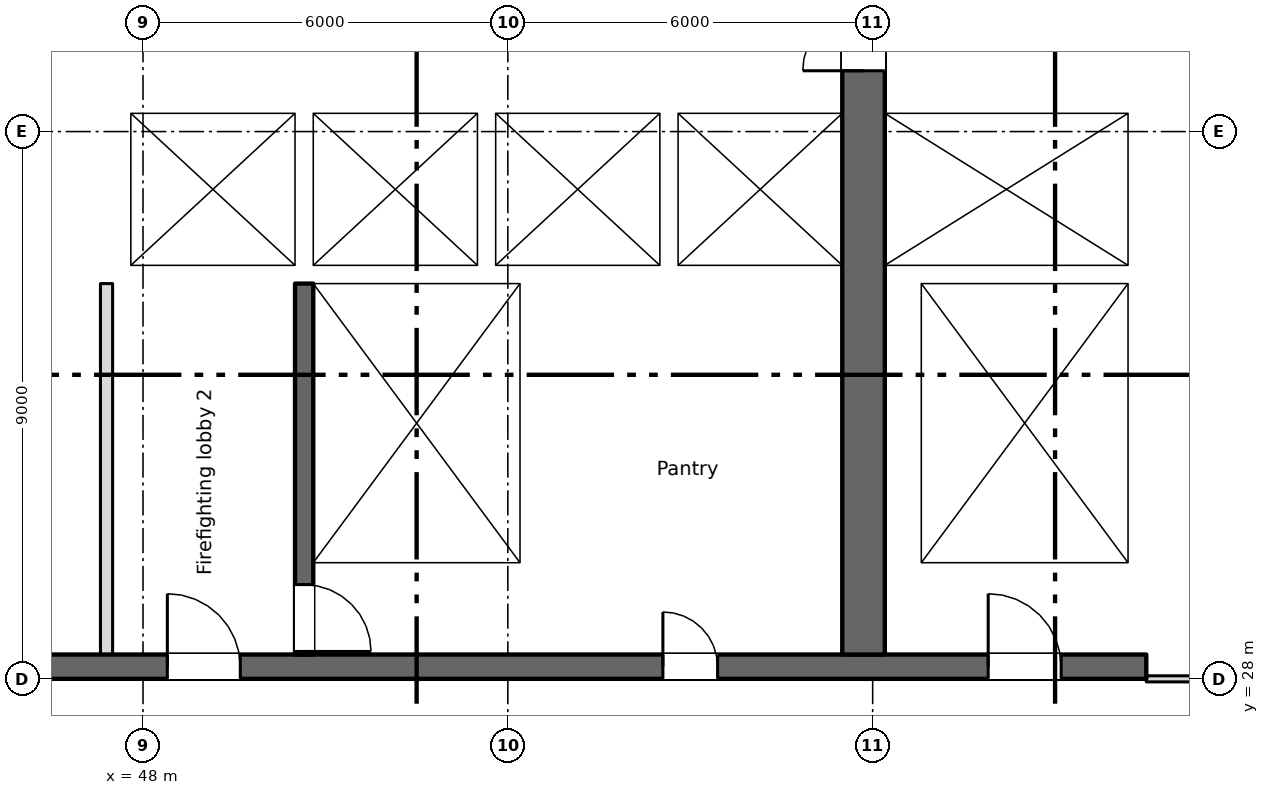
"""IFC4 building model, lengths in metres.
Left out: names, types, materials, properties, quantities, classifications, styles, units other than length and angle.
Written with IfcOpenShell. Run it as: python <this file> out.ifc"""

import sys

from ifc_helpers import new_model, si_unit, direction, frame, frame_2d, origin, place, context, subcontext, project, spatial, rectangle, extrude, element, fill, save


model = new_model("IFC4")
c1 = context("Model", 3, precision=1e-05, world=origin(), true_north=direction((0.0, 1.0)))
c2 = subcontext(c1, "Body", "Model", "MODEL_VIEW")
j1 = project(units=[si_unit("LENGTHUNIT", "METRE"), si_unit("PLANEANGLEUNIT", "RADIAN")], contexts=[c1])
p1 = place(None, origin())
s1 = spatial("IfcSite", under=j1, at=p1, CompositionType="ELEMENT")
p2 = place(p1, origin())
s2 = spatial("IfcBuilding", under=s1, at=p2, CompositionType="ELEMENT")
p3 = place(p2, frame((0.0, 0.0, 204.25)))
s3 = spatial("IfcBuildingStorey", under=s2, at=p3, CompositionType="ELEMENT", Elevation=204.25)
p4 = place(p3, frame((6.6, 28.2, 0.0), z_axis=(0.0, 0.0, 1.0), x_axis=(1.0, 0.0, 0.0)))
e1 = element("IfcWall", 1, at=p4, inside=s3, PredefinedType="SHEAR", context=c2, shape_type="SweptSolid", body=[
    extrude(rectangle(XDim=57.9, YDim=0.4, at=frame_2d((28.95, 0.0))), origin(), (0.0, 0.0, 1.0), 3.35),
])
p5 = place(p4, frame((12.663, 0.0, 0.0)))
e2 = element("IfcOpeningElement", 2, at=p5, cuts=e1, PredefinedType="OPENING", context=c2, shape_type="SweptSolid", body=[
    extrude(rectangle(XDim=0.9, YDim=2.1, at=frame_2d((0.45, 1.05))), frame((0.0, 0.21, 0.0), z_axis=(0.0, -1.0, 0.0), x_axis=(1.0, 0.0, 0.0)), (0.0, 0.0, 1.0), 0.42),
])
p6 = place(p4, frame((15.238, 0.0, 0.0)))
e3 = element("IfcOpeningElement", 3, at=p6, cuts=e1, PredefinedType="OPENING", context=c2, shape_type="SweptSolid", body=[
    extrude(rectangle(XDim=0.9, YDim=2.1, at=frame_2d((0.45, 1.05))), frame((0.0, 0.21, 0.0), z_axis=(0.0, -1.0, 0.0), x_axis=(1.0, 0.0, 0.0)), (0.0, 0.0, 1.0), 0.42),
])
p7 = place(p4, frame((49.95, 0.0, 0.0)))
e4 = element("IfcOpeningElement", 4, at=p7, cuts=e1, PredefinedType="OPENING", context=c2, shape_type="SweptSolid", body=[
    extrude(rectangle(XDim=0.9, YDim=2.1, at=frame_2d((0.45, 1.05))), frame((0.0, 0.21, 0.0), z_axis=(0.0, -1.0, 0.0), x_axis=(1.0, 0.0, 0.0)), (0.0, 0.0, 1.0), 0.42),
])
p8 = place(p4, frame((0.663, 0.0, 0.0)))
e5 = element("IfcOpeningElement", 5, at=p8, cuts=e1, PredefinedType="OPENING", context=c2, shape_type="SweptSolid", body=[
    extrude(rectangle(XDim=0.9, YDim=2.1, at=frame_2d((0.45, 1.05))), frame((0.0, 0.21, 0.0), z_axis=(0.0, -1.0, 0.0), x_axis=(1.0, 0.0, 0.0)), (0.0, 0.0, 1.0), 0.42),
])
p9 = place(p4, frame((2.238, 0.0, 0.0)))
e6 = element("IfcOpeningElement", 6, at=p9, cuts=e1, PredefinedType="OPENING", context=c2, shape_type="SweptSolid", body=[
    extrude(rectangle(XDim=0.9, YDim=2.1, at=frame_2d((0.45, 1.05))), frame((0.0, 0.21, 0.0), z_axis=(0.0, -1.0, 0.0), x_axis=(1.0, 0.0, 0.0)), (0.0, 0.0, 1.0), 0.42),
])
p10 = place(p4, frame((4.8, 0.0, 0.0)))
e7 = element("IfcOpeningElement", 7, at=p10, cuts=e1, PredefinedType="OPENING", context=c2, shape_type="SweptSolid", body=[
    extrude(rectangle(XDim=1.2, YDim=2.1, at=frame_2d((0.6, 1.05))), frame((0.0, 0.21, 0.0), z_axis=(0.0, -1.0, 0.0), x_axis=(1.0, 0.0, 0.0)), (0.0, 0.0, 1.0), 0.42),
])
p11 = place(p4, frame((31.8, 0.0, 0.0)))
e8 = element("IfcOpeningElement", 8, at=p11, cuts=e1, PredefinedType="OPENING", context=c2, shape_type="SweptSolid", body=[
    extrude(rectangle(XDim=1.2, YDim=2.1, at=frame_2d((0.6, 1.05))), frame((0.0, 0.21, 0.0), z_axis=(0.0, -1.0, 0.0), x_axis=(1.0, 0.0, 0.0)), (0.0, 0.0, 1.0), 0.42),
])
p12 = place(p4, frame((55.3, 0.0, 0.0)))
e9 = element("IfcOpeningElement", 9, at=p12, cuts=e1, PredefinedType="OPENING", context=c2, shape_type="SweptSolid", body=[
    extrude(rectangle(XDim=1.2, YDim=2.1, at=frame_2d((0.6, 1.05))), frame((0.0, 0.21, 0.0), z_axis=(0.0, -1.0, 0.0), x_axis=(1.0, 0.0, 0.0)), (0.0, 0.0, 1.0), 0.42),
])
p13 = place(p4, frame((21.8, 0.0, 0.0)))
e10 = element("IfcOpeningElement", 10, at=p13, cuts=e1, PredefinedType="OPENING", context=c2, shape_type="SweptSolid", body=[
    extrude(rectangle(XDim=1.2, YDim=2.1, at=frame_2d((0.6, 1.05))), frame((0.0, 0.21, 0.0), z_axis=(0.0, -1.0, 0.0), x_axis=(1.0, 0.0, 0.0)), (0.0, 0.0, 1.0), 0.42),
])
p14 = place(p4, frame((41.8, 0.0, 0.0)))
e11 = element("IfcOpeningElement", 11, at=p14, cuts=e1, PredefinedType="OPENING", context=c2, shape_type="SweptSolid", body=[
    extrude(rectangle(XDim=1.2, YDim=2.1, at=frame_2d((0.6, 1.05))), frame((0.0, 0.21, 0.0), z_axis=(0.0, -1.0, 0.0), x_axis=(1.0, 0.0, 0.0)), (0.0, 0.0, 1.0), 0.42),
])
p15 = place(p4, frame((24.95, 0.0, 0.0)))
e12 = element("IfcOpeningElement", 12, at=p15, cuts=e1, PredefinedType="OPENING", context=c2, shape_type="SweptSolid", body=[
    extrude(rectangle(XDim=2.4, YDim=2.1, at=frame_2d((1.2, 1.05))), frame((0.0, 0.21, 0.0), z_axis=(0.0, -1.0, 0.0), x_axis=(1.0, 0.0, 0.0)), (0.0, 0.0, 1.0), 0.42),
])
p16 = place(p4, frame((37.45, 0.0, 0.0)))
e13 = element("IfcOpeningElement", 13, at=p16, cuts=e1, PredefinedType="OPENING", context=c2, shape_type="SweptSolid", body=[
    extrude(rectangle(XDim=2.4, YDim=2.1, at=frame_2d((1.2, 1.05))), frame((0.0, 0.21, 0.0), z_axis=(0.0, -1.0, 0.0), x_axis=(1.0, 0.0, 0.0)), (0.0, 0.0, 1.0), 0.42),
])
p17 = place(p4, frame((8.1, 0.0, 0.0)))
e14 = element("IfcOpeningElement", 14, at=p17, cuts=e1, PredefinedType="OPENING", context=c2, shape_type="SweptSolid", body=[
    extrude(rectangle(XDim=2.4, YDim=2.1, at=frame_2d((1.2, 1.05))), frame((0.0, 0.21, 0.0), z_axis=(0.0, -1.0, 0.0), x_axis=(1.0, 0.0, 0.0)), (0.0, 0.0, 1.0), 0.42),
])
p18 = place(p4, frame((28.95, 0.0, 0.0)))
e15 = element("IfcOpeningElement", 15, at=p18, cuts=e1, PredefinedType="OPENING", context=c2, shape_type="SweptSolid", body=[
    extrude(rectangle(XDim=0.9, YDim=2.1, at=frame_2d((0.45, 1.05))), frame((0.0, 0.21, 0.0), z_axis=(0.0, -1.0, 0.0), x_axis=(1.0, 0.0, 0.0)), (0.0, 0.0, 1.0), 0.42),
])
p19 = place(p4, frame((34.95, 0.0, 0.0)))
e16 = element("IfcOpeningElement", 16, at=p19, cuts=e1, PredefinedType="OPENING", context=c2, shape_type="SweptSolid", body=[
    extrude(rectangle(XDim=0.9, YDim=2.1, at=frame_2d((0.45, 1.05))), frame((0.0, 0.21, 0.0), z_axis=(0.0, -1.0, 0.0), x_axis=(1.0, 0.0, 0.0)), (0.0, 0.0, 1.0), 0.42),
])
p20 = place(p3, frame((64.35, 34.8, 0.0), z_axis=(0.0, 0.0, 1.0), x_axis=(0.0, 1.0, 0.0)))
e17 = element("IfcWall", 17, at=p20, inside=s3, PredefinedType="SHEAR", context=c2, shape_type="SweptSolid", body=[
    extrude(rectangle(XDim=10.5, YDim=0.3, at=frame_2d((5.25, 0.0))), origin(), (0.0, 0.0, 1.0), 3.35),
])
p21 = place(p3, frame((59.85, 28.4, 0.0), z_axis=(0.0, 0.0, 1.0), x_axis=(0.0, 1.0, 0.0)))
e18 = element("IfcWall", 18, at=p21, inside=s3, PredefinedType="SHEAR", context=c2, shape_type="SweptSolid", body=[
    extrude(rectangle(XDim=16.9, YDim=0.7, at=frame_2d((8.45, 0.0))), origin(), (0.0, 0.0, 1.0), 3.35),
])
p22 = place(p21, frame((9.6, 0.0, 0.0)))
e19 = element("IfcOpeningElement", 19, at=p22, cuts=e18, PredefinedType="OPENING", context=c2, shape_type="SweptSolid", body=[
    extrude(rectangle(XDim=2.0, YDim=2.1, at=frame_2d((1.0, 1.05))), frame((0.0, 0.36, 0.0), z_axis=(0.0, -1.0, 0.0), x_axis=(1.0, 0.0, 0.0)), (0.0, 0.0, 1.0), 0.72),
])
p23 = place(p21, frame((15.4, 0.0, 0.0)))
e20 = element("IfcOpeningElement", 20, at=p23, cuts=e18, PredefinedType="OPENING", context=c2, shape_type="SweptSolid", body=[
    extrude(rectangle(XDim=1.2, YDim=2.1, at=frame_2d((0.6, 1.05))), frame((0.0, 0.36, 0.0), z_axis=(0.0, -1.0, 0.0), x_axis=(1.0, 0.0, 0.0)), (0.0, 0.0, 1.0), 0.72),
])
p24 = place(p3, frame((50.65, 34.5, 0.0), z_axis=(0.0, 0.0, 1.0), x_axis=(0.0, -1.0, 0.0)))
e21 = element("IfcWall", 21, at=p24, inside=s3, PredefinedType="SHEAR", context=c2, shape_type="SweptSolid", body=[
    extrude(rectangle(XDim=6.1, YDim=0.3, at=frame_2d((3.05, 0.0))), origin(), (0.0, 0.0, 1.0), 3.35),
])
p25 = place(p24, frame((4.95, 0.0, 0.0)))
e22 = element("IfcOpeningElement", 22, at=p25, cuts=e21, PredefinedType="OPENING", context=c2, shape_type="SweptSolid", body=[
    extrude(rectangle(XDim=1.1, YDim=2.1, at=frame_2d((0.55, 1.05))), frame((0.0, 0.16, 0.0), z_axis=(0.0, -1.0, 0.0), x_axis=(1.0, 0.0, 0.0)), (0.0, 0.0, 1.0), 0.32),
])
p26 = place(p3, frame((54.35, 28.4, 0.0), z_axis=(0.0, 0.0, 1.0), x_axis=(0.0, 1.0, 0.0)))
e23 = element("IfcWall", 23, at=p26, inside=s3, PredefinedType="SHEAR", context=c2, shape_type="SweptSolid", body=[
    extrude(rectangle(XDim=6.1, YDim=0.3, at=frame_2d((3.05, 0.0))), origin(), (0.0, 0.0, 1.0), 3.35),
])
p27 = place(p3, frame((60.5, 28.4, 0.0), z_axis=(0.0, 0.0, 1.0), x_axis=(0.0, 1.0, 0.0)))
e24 = element("IfcWall", 24, at=p27, inside=s3, PredefinedType="SHEAR", context=c2, shape_type="SweptSolid", body=[
    extrude(rectangle(XDim=6.1, YDim=0.6, at=frame_2d((3.05, 0.0))), origin(), (0.0, 0.0, 1.0), 3.35),
])
p28 = place(p3, frame((64.35, 28.4, 0.0), z_axis=(0.0, 0.0, 1.0), x_axis=(0.0, 1.0, 0.0)))
e25 = element("IfcWall", 25, at=p28, inside=s3, PredefinedType="SHEAR", context=c2, shape_type="SweptSolid", body=[
    extrude(rectangle(XDim=6.1, YDim=0.3, at=frame_2d((3.05, 0.0))), origin(), (0.0, 0.0, 1.0), 3.35),
])
p29 = place(p3, frame((47.3, 34.65, 0.0), z_axis=(0.0, 0.0, 1.0), x_axis=(1.0, 0.0, 0.0)))
e26 = element("IfcWall", 26, at=p29, inside=s3, PredefinedType="SHEAR", context=c2, shape_type="SweptSolid", body=[
    extrude(rectangle(XDim=12.2, YDim=0.3, at=frame_2d((6.1, 0.0))), origin(), (0.0, 0.0, 1.0), 3.35),
])
p30 = place(p29, frame((1.3, 0.0, 0.0)))
e27 = element("IfcOpeningElement", 27, at=p30, cuts=e26, PredefinedType="OPENING", context=c2, shape_type="SweptSolid", body=[
    extrude(rectangle(XDim=1.1, YDim=2.1, at=frame_2d((0.55, 1.05))), frame((0.0, 0.16, 0.0), z_axis=(0.0, -1.0, 0.0), x_axis=(1.0, 0.0, 0.0)), (0.0, 0.0, 1.0), 0.32),
])
p31 = place(p3, frame((60.2, 34.65, 0.0), z_axis=(0.0, 0.0, 1.0), x_axis=(1.0, 0.0, 0.0)))
e28 = element("IfcWall", 28, at=p31, inside=s3, PredefinedType="SHEAR", context=c2, shape_type="SweptSolid", body=[
    extrude(rectangle(XDim=4.3, YDim=0.3, at=frame_2d((2.15, 0.0))), origin(), (0.0, 0.0, 1.0), 3.35),
])
p32 = place(p3, frame((47.3, 37.45, 0.0), z_axis=(0.0, 0.0, 1.0), x_axis=(1.0, 0.0, 0.0)))
e29 = element("IfcWall", 29, at=p32, inside=s3, PredefinedType="SHEAR", context=c2, shape_type="SweptSolid", body=[
    extrude(rectangle(XDim=12.2, YDim=0.3, at=frame_2d((6.1, 0.0))), origin(), (0.0, 0.0, 1.0), 3.35),
])
p33 = place(p32, frame((4.3, 0.0, 0.0)))
e30 = element("IfcOpeningElement", 30, at=p33, cuts=e29, PredefinedType="OPENING", context=c2, shape_type="SweptSolid", body=[
    extrude(rectangle(XDim=1.1, YDim=2.1, at=frame_2d((0.55, 1.05))), frame((0.0, 0.16, 0.0), z_axis=(0.0, -1.0, 0.0), x_axis=(1.0, 0.0, 0.0)), (0.0, 0.0, 1.0), 0.32),
])
p34 = place(p32, frame((7.3, 0.0, 0.0)))
e31 = element("IfcOpeningElement", 31, at=p34, cuts=e29, PredefinedType="OPENING", context=c2, shape_type="SweptSolid", body=[
    extrude(rectangle(XDim=1.1, YDim=2.1, at=frame_2d((0.55, 1.05))), frame((0.0, 0.16, 0.0), z_axis=(0.0, -1.0, 0.0), x_axis=(1.0, 0.0, 0.0)), (0.0, 0.0, 1.0), 0.32),
])
p35 = place(p32, frame((10.3, 0.0, 0.0)))
e32 = element("IfcOpeningElement", 32, at=p35, cuts=e29, PredefinedType="OPENING", context=c2, shape_type="SweptSolid", body=[
    extrude(rectangle(XDim=1.1, YDim=2.1, at=frame_2d((0.55, 1.05))), frame((0.0, 0.16, 0.0), z_axis=(0.0, -1.0, 0.0), x_axis=(1.0, 0.0, 0.0)), (0.0, 0.0, 1.0), 0.32),
])
p36 = place(p3, frame((60.2, 37.45, 0.0), z_axis=(0.0, 0.0, 1.0), x_axis=(1.0, 0.0, 0.0)))
e33 = element("IfcWall", 33, at=p36, inside=s3, PredefinedType="SHEAR", context=c2, shape_type="SweptSolid", body=[
    extrude(rectangle(XDim=4.0, YDim=0.3, at=frame_2d((2.0, 0.0))), origin(), (0.0, 0.0, 1.0), 3.35),
])
p37 = place(p36, frame((1.45, 0.0, 0.0)))
e34 = element("IfcOpeningElement", 34, at=p37, cuts=e33, PredefinedType="OPENING", context=c2, shape_type="SweptSolid", body=[
    extrude(rectangle(XDim=1.1, YDim=2.1, at=frame_2d((0.55, 1.05))), frame((0.0, 0.16, 0.0), z_axis=(0.0, -1.0, 0.0), x_axis=(1.0, 0.0, 0.0)), (0.0, 0.0, 1.0), 0.32),
])
p38 = place(p3, frame((47.55, 34.8, 0.0), z_axis=(0.0, 0.0, 1.0), x_axis=(0.0, 1.0, 0.0)))
e35 = element("IfcWall", 35, at=p38, inside=s3, PredefinedType="SHEAR", context=c2, shape_type="SweptSolid", body=[
    extrude(rectangle(XDim=2.5, YDim=0.5, at=frame_2d((1.25, 0.0))), origin(), (0.0, 0.0, 1.0), 3.35),
])
for number, where, z_axis, x_axis in (
    (36, (50.65, 34.8, 0.0), (0.0, 0.0, 1.0), (0.0, 1.0, 0.0)),
    (37, (53.65, 34.8, 0.0), (0.0, 0.0, 1.0), (0.0, 1.0, 0.0)),
    (38, (56.65, 34.8, 0.0), (0.0, 0.0, 1.0), (0.0, 1.0, 0.0)),
):
    element("IfcWall", number, at=place(p3, frame(where, z_axis=z_axis, x_axis=x_axis)), inside=s3, PredefinedType="SHEAR", context=c2, shape_type="SweptSolid", body=[
        extrude(rectangle(XDim=2.5, YDim=0.3, at=frame_2d((1.25, 0.0))), origin(), (0.0, 0.0, 1.0), 3.35),
    ])
p39 = place(p3, frame((47.4, 28.4, 0.0), z_axis=(0.0, 0.0, 1.0), x_axis=(0.0, 1.0, 0.0)))
e39 = element("IfcWall", 39, at=p39, inside=s3, PredefinedType="PARTITIONING", context=c2, shape_type="SweptSolid", body=[
    extrude(rectangle(XDim=6.1, YDim=0.2, at=frame_2d((3.05, 0.0))), origin(), (0.0, 0.0, 1.0), 3.35),
])
p40 = place(p3, frame((64.5, 28.0, 0.0), z_axis=(0.0, 0.0, 1.0), x_axis=(1.0, 0.0, 0.0)))
e40 = element("IfcWall", 40, at=p40, inside=s3, PredefinedType="PARTITIONING", context=c2, shape_type="SweptSolid", body=[
    extrude(rectangle(XDim=6.9, YDim=0.1, at=frame_2d((3.45, 0.0))), origin(), (0.0, 0.0, 1.0), 3.35),
])
p41 = place(p40, frame((2.55, 0.0, 0.0)))
e41 = element("IfcOpeningElement", 41, at=p41, cuts=e40, PredefinedType="OPENING", context=c2, shape_type="SweptSolid", body=[
    extrude(rectangle(XDim=1.8, YDim=2.1, at=frame_2d((0.9, 1.05))), frame((0.0, 0.06, 0.0), z_axis=(0.0, -1.0, 0.0), x_axis=(1.0, 0.0, 0.0)), (0.0, 0.0, 1.0), 0.12),
])
p42 = place(p7, origin())
e42 = element("IfcDoor", 42, at=p42, inside=s3, OperationType="SINGLE_SWING_LEFT", PredefinedType="DOOR", context=c2, shape_type="SweptSolid", body=[
    extrude(rectangle(XDim=0.9, YDim=2.1, at=frame_2d((0.45, 1.05))), frame((0.0, 0.025, 0.0), z_axis=(0.0, -1.0, 0.0), x_axis=(1.0, 0.0, 0.0)), (0.0, 0.0, 1.0), 0.05),
])
fill(e4, e42)
p43 = place(p33, origin())
e43 = element("IfcDoor", 43, at=p43, inside=s3, OperationType="SLIDING_TO_LEFT", PredefinedType="DOOR", context=c2, shape_type="SweptSolid", body=[
    extrude(rectangle(XDim=1.1, YDim=2.1, at=frame_2d((0.55, 1.05))), frame((0.0, 0.025, 0.0), z_axis=(0.0, -1.0, 0.0), x_axis=(1.0, 0.0, 0.0)), (0.0, 0.0, 1.0), 0.05),
])
fill(e30, e43)
p44 = place(p34, origin())
e44 = element("IfcDoor", 44, at=p44, inside=s3, OperationType="SLIDING_TO_LEFT", PredefinedType="DOOR", context=c2, shape_type="SweptSolid", body=[
    extrude(rectangle(XDim=1.1, YDim=2.1, at=frame_2d((0.55, 1.05))), frame((0.0, 0.025, 0.0), z_axis=(0.0, -1.0, 0.0), x_axis=(1.0, 0.0, 0.0)), (0.0, 0.0, 1.0), 0.05),
])
fill(e31, e44)
p45 = place(p35, origin())
e45 = element("IfcDoor", 45, at=p45, inside=s3, OperationType="SLIDING_TO_LEFT", PredefinedType="DOOR", context=c2, shape_type="SweptSolid", body=[
    extrude(rectangle(XDim=1.1, YDim=2.1, at=frame_2d((0.55, 1.05))), frame((0.0, 0.025, 0.0), z_axis=(0.0, -1.0, 0.0), x_axis=(1.0, 0.0, 0.0)), (0.0, 0.0, 1.0), 0.05),
])
fill(e32, e45)
p46 = place(p37, origin())
e46 = element("IfcDoor", 46, at=p46, inside=s3, OperationType="SLIDING_TO_LEFT", PredefinedType="DOOR", context=c2, shape_type="SweptSolid", body=[
    extrude(rectangle(XDim=1.1, YDim=2.1, at=frame_2d((0.55, 1.05))), frame((0.0, 0.025, 0.0), z_axis=(0.0, -1.0, 0.0), x_axis=(1.0, 0.0, 0.0)), (0.0, 0.0, 1.0), 0.05),
])
fill(e34, e46)
p47 = place(p30, origin())
e47 = element("IfcDoor", 47, at=p47, inside=s3, OperationType="SLIDING_TO_LEFT", PredefinedType="DOOR", context=c2, shape_type="SweptSolid", body=[
    extrude(rectangle(XDim=1.1, YDim=2.1, at=frame_2d((0.55, 1.05))), frame((0.0, 0.025, 0.0), z_axis=(0.0, -1.0, 0.0), x_axis=(1.0, 0.0, 0.0)), (0.0, 0.0, 1.0), 0.05),
])
fill(e27, e47)
p48 = place(p25, origin())
e48 = element("IfcDoor", 48, at=p48, inside=s3, OperationType="SINGLE_SWING_RIGHT", PredefinedType="DOOR", context=c2, shape_type="SweptSolid", body=[
    extrude(rectangle(XDim=1.1, YDim=2.1, at=frame_2d((0.55, 1.05))), frame((0.0, 0.025, 0.0), z_axis=(0.0, -1.0, 0.0), x_axis=(1.0, 0.0, 0.0)), (0.0, 0.0, 1.0), 0.05),
])
fill(e22, e48)
p49 = place(p12, origin())
e49 = element("IfcDoor", 49, at=p49, inside=s3, OperationType="SINGLE_SWING_LEFT", PredefinedType="DOOR", context=c2, shape_type="SweptSolid", body=[
    extrude(rectangle(XDim=1.2, YDim=2.1, at=frame_2d((0.6, 1.05))), frame((0.0, 0.025, 0.0), z_axis=(0.0, -1.0, 0.0), x_axis=(1.0, 0.0, 0.0)), (0.0, 0.0, 1.0), 0.05),
])
fill(e9, e49)
p50 = place(p14, origin())
e50 = element("IfcDoor", 50, at=p50, inside=s3, OperationType="SINGLE_SWING_LEFT", PredefinedType="DOOR", context=c2, shape_type="SweptSolid", body=[
    extrude(rectangle(XDim=1.2, YDim=2.1, at=frame_2d((0.6, 1.05))), frame((0.0, 0.025, 0.0), z_axis=(0.0, -1.0, 0.0), x_axis=(1.0, 0.0, 0.0)), (0.0, 0.0, 1.0), 0.05),
])
fill(e11, e50)
p51 = place(p22, origin())
e51 = element("IfcDoor", 51, at=p51, inside=s3, OperationType="DOUBLE_DOOR_SINGLE_SWING", PredefinedType="DOOR", context=c2, shape_type="SweptSolid", body=[
    extrude(rectangle(XDim=2.0, YDim=2.1, at=frame_2d((1.0, 1.05))), frame((0.0, 0.025, 0.0), z_axis=(0.0, -1.0, 0.0), x_axis=(1.0, 0.0, 0.0)), (0.0, 0.0, 1.0), 0.05),
])
fill(e19, e51)
save(model, sys.argv[1])
